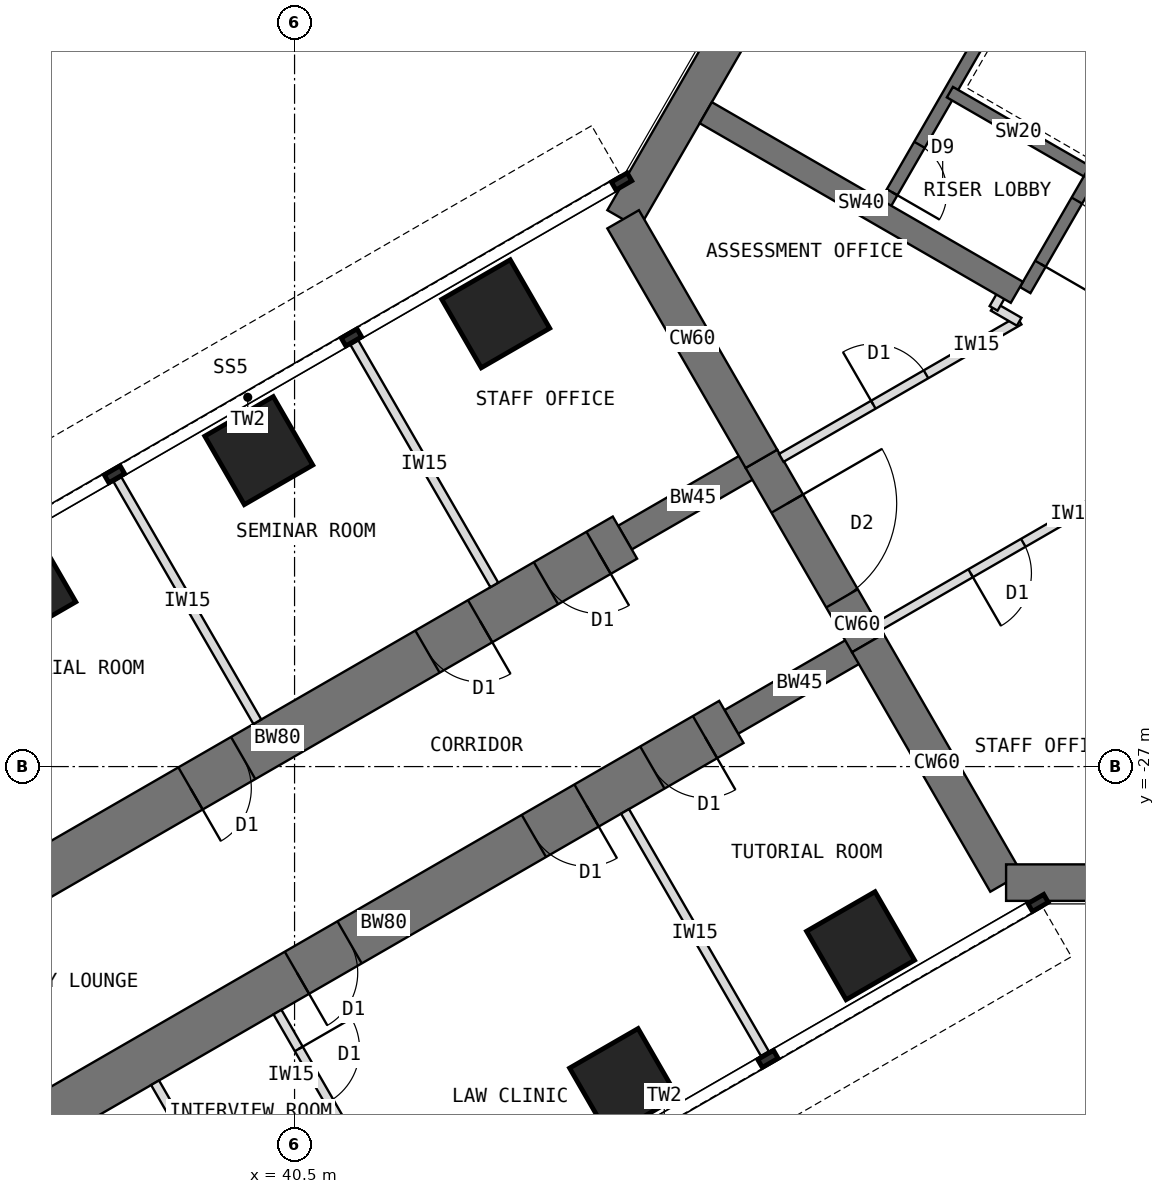
"""IFC4 building model, lengths in metres.
Left out: names, types, materials, properties, quantities, classifications, styles, units other than length and angle.
Written with IfcOpenShell. Run it as: python <this file> out.ifc"""

import sys

from ifc_helpers import new_model, si_unit, direction, frame, frame_2d, origin, origin_2d, place, context, subcontext, project, spatial, rectangle, extrude, element, fill, save


model = new_model("IFC4")
c1 = context("Model", 3, precision=1e-05, world=origin(), true_north=direction((0.0, 1.0)))
c2 = subcontext(c1, "Body", "Model", "MODEL_VIEW")
j1 = project(units=[si_unit("LENGTHUNIT", "METRE"), si_unit("PLANEANGLEUNIT", "RADIAN")], contexts=[c1])
p1 = place(None, origin())
s1 = spatial("IfcSite", under=j1, at=p1, CompositionType="ELEMENT")
p2 = place(p1, origin())
s2 = spatial("IfcBuilding", under=s1, at=p2, CompositionType="ELEMENT")
p3 = place(p2, frame((0.0, 0.0, 121.5)))
s3 = spatial("IfcBuildingStorey", under=s2, at=p3, CompositionType="ELEMENT", Elevation=121.5)
p4 = place(p3, frame((52.202, -7.092, 0.0), z_axis=(0.0, 0.0, 1.0), x_axis=(-0.500005998175, -0.866021940709, 0.0)))
e1 = element("IfcWall", 1, at=p4, inside=s3, PredefinedType="SHEAR", context=c2, shape_type="SweptSolid", body=[
    extrude(rectangle(XDim=12.596, YDim=0.6, at=frame_2d((6.298, 0.0))), origin(), (0.0, 0.0, 1.0), 4.0),
])
p5 = place(p3, frame((45.904, -18.0, 0.0), z_axis=(0.0, 0.0, 1.0), x_axis=(0.500024481964, -0.866011268655, 0.0)))
e2 = element("IfcWall", 2, at=p5, inside=s3, PredefinedType="SHEAR", context=c2, shape_type="SweptSolid", body=[
    extrude(rectangle(XDim=4.548, YDim=0.6, at=frame_2d((2.274, 0.0))), origin(), (0.0, 0.0, 1.0), 4.0),
])
p6 = place(p3, frame((48.178, -21.939, 0.0), z_axis=(0.0, 0.0, 1.0), x_axis=(0.500010275428, -0.866019471182, 0.0)))
e3 = element("IfcWall", 3, at=p6, inside=s3, PredefinedType="SHEAR", context=c2, shape_type="SweptSolid", body=[
    extrude(rectangle(XDim=3.5, YDim=0.6, at=frame_2d((1.75, 0.0))), origin(), (0.0, 0.0, 1.0), 4.0),
])
p7 = place(p6, frame((0.85, 0.0, 0.0)))
e4 = element("IfcOpeningElement", 4, at=p7, cuts=e3, PredefinedType="OPENING", context=c2, shape_type="SweptSolid", body=[
    extrude(rectangle(XDim=1.8, YDim=2.1, at=frame_2d((0.9, 1.05))), frame((0.0, 0.31, 0.0), z_axis=(0.0, -1.0, 0.0), x_axis=(1.0, 0.0, 0.0)), (0.0, 0.0, 1.0), 0.62),
])
p8 = place(p3, frame((49.928, -24.97, 0.0), z_axis=(0.0, 0.0, 1.0), x_axis=(0.499984222037, -0.866034513004, 0.0)))
e5 = element("IfcWall", 5, at=p8, inside=s3, PredefinedType="SHEAR", context=c2, shape_type="SweptSolid", body=[
    extrude(rectangle(XDim=4.548, YDim=0.6, at=frame_2d((2.274, 0.0))), origin(), (0.0, 0.0, 1.0), 4.0),
])
p9 = place(p3, frame((52.202, -28.908, 0.0), z_axis=(0.0, 0.0, 1.0), x_axis=(1.0, 0.0, 0.0)))
e6 = element("IfcWall", 6, at=p9, inside=s3, PredefinedType="SHEAR", context=c2, shape_type="SweptSolid", body=[
    extrude(rectangle(XDim=12.596, YDim=0.6, at=frame_2d((6.298, 0.0))), origin(), (0.0, 0.0, 1.0), 4.0),
])
p10 = place(p3, frame((49.928, -24.97, 0.0), z_axis=(0.0, 0.0, 1.0), x_axis=(-0.866031863473, -0.499988811324, 0.0)))
e7 = element("IfcWall", 7, at=p10, inside=s3, PredefinedType="SHEAR", context=c2, shape_type="SweptSolid", body=[
    extrude(rectangle(XDim=2.592, YDim=0.45, at=frame_2d((1.296, 0.0))), origin(), (0.0, 0.0, 1.0), 4.0),
])
p11 = place(p3, frame((47.684, -26.266, 0.0), z_axis=(0.0, 0.0, 1.0), x_axis=(-0.866027579429, -0.499996231654, 0.0)))
e8 = element("IfcWall", 8, at=p11, inside=s3, PredefinedType="SHEAR", context=c2, shape_type="SweptSolid", body=[
    extrude(rectangle(XDim=13.2, YDim=0.8, at=frame_2d((6.6, 0.0))), origin(), (0.0, 0.0, 1.0), 4.0),
])
p12 = place(p11, frame((0.5, 0.0, 0.0)))
e9 = element("IfcOpeningElement", 9, at=p12, cuts=e8, PredefinedType="OPENING", context=c2, shape_type="SweptSolid", body=[
    extrude(rectangle(XDim=1.0, YDim=2.1, at=frame_2d((0.5, 1.05))), frame((0.0, 0.41, 0.0), z_axis=(0.0, -1.0, 0.0), x_axis=(1.0, 0.0, 0.0)), (0.0, 0.0, 1.0), 0.82),
])
p13 = place(p11, frame((2.75, 0.0, 0.0)))
e10 = element("IfcOpeningElement", 10, at=p13, cuts=e8, PredefinedType="OPENING", context=c2, shape_type="SweptSolid", body=[
    extrude(rectangle(XDim=1.0, YDim=2.1, at=frame_2d((0.5, 1.05))), frame((0.0, 0.41, 0.0), z_axis=(0.0, -1.0, 0.0), x_axis=(1.0, 0.0, 0.0)), (0.0, 0.0, 1.0), 0.82),
])
p14 = place(p11, frame((7.25, 0.0, 0.0)))
e11 = element("IfcOpeningElement", 11, at=p14, cuts=e8, PredefinedType="OPENING", context=c2, shape_type="SweptSolid", body=[
    extrude(rectangle(XDim=1.0, YDim=2.1, at=frame_2d((0.5, 1.05))), frame((0.0, 0.41, 0.0), z_axis=(0.0, -1.0, 0.0), x_axis=(1.0, 0.0, 0.0)), (0.0, 0.0, 1.0), 0.82),
])
p15 = place(p3, frame((48.178, -21.939, 0.0), z_axis=(0.0, 0.0, 1.0), x_axis=(-0.866072649678, -0.499918158782, 0.0)))
e12 = element("IfcWall", 12, at=p15, inside=s3, PredefinedType="SHEAR", context=c2, shape_type="SweptSolid", body=[
    extrude(rectangle(XDim=2.592, YDim=0.45, at=frame_2d((1.296, 0.0))), origin(), (0.0, 0.0, 1.0), 4.0),
])
p16 = place(p3, frame((45.934, -23.234, 0.0), z_axis=(0.0, 0.0, 1.0), x_axis=(-0.866019570528, -0.500010103361, 0.0)))
e13 = element("IfcWall", 13, at=p16, inside=s3, PredefinedType="SHEAR", context=c2, shape_type="SweptSolid", body=[
    extrude(rectangle(XDim=13.2, YDim=0.8, at=frame_2d((6.6, 0.0))), origin(), (0.0, 0.0, 1.0), 4.0),
])
p17 = place(p16, frame((0.5, 0.0, 0.0)))
e14 = element("IfcOpeningElement", 14, at=p17, cuts=e13, PredefinedType="OPENING", context=c2, shape_type="SweptSolid", body=[
    extrude(rectangle(XDim=1.0, YDim=2.1, at=frame_2d((0.5, 1.05))), frame((0.0, 0.41, 0.0), z_axis=(0.0, -1.0, 0.0), x_axis=(1.0, 0.0, 0.0)), (0.0, 0.0, 1.0), 0.82),
])
p18 = place(p16, frame((2.75, 0.0, 0.0)))
e15 = element("IfcOpeningElement", 15, at=p18, cuts=e13, PredefinedType="OPENING", context=c2, shape_type="SweptSolid", body=[
    extrude(rectangle(XDim=1.0, YDim=2.1, at=frame_2d((0.5, 1.05))), frame((0.0, 0.41, 0.0), z_axis=(0.0, -1.0, 0.0), x_axis=(1.0, 0.0, 0.0)), (0.0, 0.0, 1.0), 0.82),
])
p19 = place(p16, frame((7.25, 0.0, 0.0)))
e16 = element("IfcOpeningElement", 16, at=p19, cuts=e13, PredefinedType="OPENING", context=c2, shape_type="SweptSolid", body=[
    extrude(rectangle(XDim=1.0, YDim=2.1, at=frame_2d((0.5, 1.05))), frame((0.0, 0.41, 0.0), z_axis=(0.0, -1.0, 0.0), x_axis=(1.0, 0.0, 0.0)), (0.0, 0.0, 1.0), 0.82),
])
for number, where, z_axis, x_axis in (
    (17, (49.809, -29.946, 0.0), (0.0, 0.0, 1.0), (0.866, 0.5, 0.0)),
    (18, (43.809, -19.554, 0.0), (0.0, 0.0, 1.0), (0.866, 0.5, 0.0)),
    (19, (45.912, -32.196, 0.0), (0.0, 0.0, 1.0), (0.866, 0.5, 0.0)),
    (20, (39.912, -21.804, 0.0), (0.0, 0.0, 1.0), (0.866, 0.5, 0.0)),
    (21, (36.014, -24.054, 0.0), (0.0, 0.0, 1.0), (0.866, 0.5, 0.0)),
):
    element("IfcColumn", number, at=place(p3, frame(where, z_axis=z_axis, x_axis=x_axis)), inside=s3, PredefinedType="COLUMN", context=c2, shape_type="SweptSolid", body=[
        extrude(rectangle(XDim=1.3, YDim=1.3, at=origin_2d()), origin(), (0.0, 0.0, 1.0), 4.0),
    ])
p20 = place(p3, frame((56.516, -12.236, 0.0), z_axis=(0.0, 0.0, 1.0), x_axis=(-0.49999894854, -0.866026010844, 0.0)))
e22 = element("IfcWall", 22, at=p20, inside=s3, PredefinedType="SHEAR", context=c2, shape_type="SweptSolid", body=[
    extrude(rectangle(XDim=8.0, YDim=0.2, at=frame_2d((4.0, 0.0))), origin(), (0.0, 0.0, 1.0), 4.0),
])
p21 = place(p20, frame((6.3, 0.0, 0.0)))
e23 = element("IfcOpeningElement", 23, at=p21, cuts=e22, PredefinedType="OPENING", context=c2, shape_type="SweptSolid", body=[
    extrude(rectangle(XDim=1.2, YDim=2.1, at=frame_2d((0.6, 1.05))), frame((0.0, 0.11, 0.0), z_axis=(0.0, -1.0, 0.0), x_axis=(1.0, 0.0, 0.0)), (0.0, 0.0, 1.0), 0.22),
])
p22 = place(p3, frame((53.53, -17.209, 0.0), z_axis=(0.0, 0.0, 1.0), x_axis=(-0.866062058628, 0.499936506574, 0.0)))
e24 = element("IfcWall", 24, at=p22, inside=s3, PredefinedType="SHEAR", context=c2, shape_type="SweptSolid", body=[
    extrude(rectangle(XDim=2.6, YDim=0.2, at=frame_2d((1.3, 0.0))), origin(), (0.0, 0.0, 1.0), 4.0),
])
p23 = place(p3, frame((54.178, -10.886, 0.0), z_axis=(0.0, 0.0, 1.0), x_axis=(-0.49999894854, -0.866026010844, 0.0)))
e25 = element("IfcWall", 25, at=p23, inside=s3, PredefinedType="SHEAR", context=c2, shape_type="SweptSolid", body=[
    extrude(rectangle(XDim=8.0, YDim=0.2, at=frame_2d((4.0, 0.0))), origin(), (0.0, 0.0, 1.0), 4.0),
])
p24 = place(p23, frame((6.8, 0.0, 0.0)))
e26 = element("IfcOpeningElement", 26, at=p24, cuts=e25, PredefinedType="OPENING", context=c2, shape_type="SweptSolid", body=[
    extrude(rectangle(XDim=0.9, YDim=2.1, at=frame_2d((0.45, 1.05))), frame((0.0, 0.11, 0.0), z_axis=(0.0, -1.0, 0.0), x_axis=(1.0, 0.0, 0.0)), (0.0, 0.0, 1.0), 0.22),
])
p25 = place(p3, frame((52.38, -19.201, 0.0), z_axis=(0.0, 0.0, 1.0), x_axis=(-0.866027317282, 0.49999668571, 0.0)))
e27 = element("IfcWall", 27, at=p25, inside=s3, PredefinedType="SHEAR", context=c2, shape_type="SweptSolid", body=[
    extrude(rectangle(XDim=5.908, YDim=0.4, at=frame_2d((2.954, 0.0))), origin(), (0.0, 0.0, 1.0), 4.0),
])
p26 = place(p3, frame((45.935, -27.737, 0.0), z_axis=(0.0, 0.0, 1.0), x_axis=(0.500014953309, -0.866016770315, 0.0)))
e28 = element("IfcWall", 28, at=p26, inside=s3, PredefinedType="PARTITIONING", context=c2, shape_type="SweptSolid", body=[
    extrude(rectangle(XDim=4.6, YDim=0.15, at=frame_2d((2.3, 0.0))), origin(), (0.0, 0.0, 1.0), 3.8),
])
p27 = place(p3, frame((40.219, -31.037, 0.0), z_axis=(0.0, 0.0, 1.0), x_axis=(0.500033551112, -0.866006032174, 0.0)))
e29 = element("IfcWall", 29, at=p27, inside=s3, PredefinedType="PARTITIONING", context=c2, shape_type="SweptSolid", body=[
    extrude(rectangle(XDim=2.4, YDim=0.15, at=frame_2d((1.2, 0.0))), origin(), (0.0, 0.0, 1.0), 3.8),
])
p28 = place(p27, frame((0.7, 0.0, 0.0)))
e30 = element("IfcOpeningElement", 30, at=p28, cuts=e29, PredefinedType="OPENING", context=c2, shape_type="SweptSolid", body=[
    extrude(rectangle(XDim=1.0, YDim=2.1, at=frame_2d((0.5, 1.05))), frame((0.0, 0.085, 0.0), z_axis=(0.0, -1.0, 0.0), x_axis=(1.0, 0.0, 0.0)), (0.0, 0.0, 1.0), 0.17),
])
p29 = place(p3, frame((38.206, -32.199, 0.0), z_axis=(0.0, 0.0, 1.0), x_axis=(0.500001309137, -0.866024647952, 0.0)))
e31 = element("IfcWall", 31, at=p29, inside=s3, PredefinedType="PARTITIONING", context=c2, shape_type="SweptSolid", body=[
    extrude(rectangle(XDim=2.4, YDim=0.15, at=frame_2d((1.2, 0.0))), origin(), (0.0, 0.0, 1.0), 3.8),
])
for number, where, z_axis, x_axis in (
    (32, (43.785, -24.013, 0.0), (0.0, 0.0, 1.0), (-0.5, 0.866, 0.0)),
    (33, (39.888, -26.263, 0.0), (0.0, 0.0, 1.0), (-0.5, 0.866, 0.0)),
):
    element("IfcWall", number, at=place(p3, frame(where, z_axis=z_axis, x_axis=x_axis)), inside=s3, PredefinedType="PARTITIONING", context=c2, shape_type="SweptSolid", body=[
        extrude(rectangle(XDim=4.6, YDim=0.15, at=frame_2d((2.3, 0.0))), origin(), (0.0, 0.0, 1.0), 3.8),
    ])
p30 = place(p3, frame((54.017, -22.436, 0.0), z_axis=(0.0, 0.0, 1.0), x_axis=(-0.86602002524, -0.500009315796, 0.0)))
e34 = element("IfcWall", 34, at=p30, inside=s3, PredefinedType="PARTITIONING", context=c2, shape_type="SweptSolid", body=[
    extrude(rectangle(XDim=4.519, YDim=0.15, at=frame_2d((2.259, 0.0))), origin(), (0.0, 0.0, 1.0), 3.8),
])
p31 = place(p30, frame((1.769, 0.0, 0.0)))
e35 = element("IfcOpeningElement", 35, at=p31, cuts=e34, PredefinedType="OPENING", context=c2, shape_type="SweptSolid", body=[
    extrude(rectangle(XDim=1.0, YDim=2.1, at=frame_2d((0.5, 1.05))), frame((0.0, 0.085, 0.0), z_axis=(0.0, -1.0, 0.0), x_axis=(1.0, 0.0, 0.0)), (0.0, 0.0, 1.0), 0.17),
])
p32 = place(p3, frame((48.504, -21.924, 0.0), z_axis=(0.0, 0.0, 1.0), x_axis=(0.866006515865, 0.500032713409, 0.0)))
e36 = element("IfcWall", 36, at=p32, inside=s3, PredefinedType="PARTITIONING", context=c2, shape_type="SweptSolid", body=[
    extrude(rectangle(XDim=4.518, YDim=0.15, at=frame_2d((2.259, 0.0))), origin(), (0.0, 0.0, 1.0), 3.8),
])
p33 = place(p32, frame((1.749, 0.0, 0.0)))
e37 = element("IfcOpeningElement", 37, at=p33, cuts=e36, PredefinedType="OPENING", context=c2, shape_type="SweptSolid", body=[
    extrude(rectangle(XDim=1.0, YDim=2.1, at=frame_2d((0.5, 1.05))), frame((0.0, 0.085, 0.0), z_axis=(0.0, -1.0, 0.0), x_axis=(1.0, 0.0, 0.0)), (0.0, 0.0, 1.0), 0.17),
])
p34 = place(p3, frame((52.417, -19.684, 0.0), z_axis=(0.0, 0.0, 1.0), x_axis=(-0.865831790172, 0.50033519877, 0.0)))
e38 = element("IfcWall", 38, at=p34, inside=s3, PredefinedType="PARTITIONING", context=c2, shape_type="SweptSolid", body=[
    extrude(rectangle(XDim=0.494, YDim=0.15, at=frame_2d((0.247, 0.0))), origin(), (0.0, 0.0, 1.0), 3.8),
])
p35 = place(p3, frame((51.997, -19.464, 0.0), z_axis=(0.0, 0.0, 1.0), x_axis=(0.499804398801, 0.866138304741, 0.0)))
e39 = element("IfcWall", 39, at=p35, inside=s3, PredefinedType="PARTITIONING", context=c2, shape_type="SweptSolid", body=[
    extrude(rectangle(XDim=0.43, YDim=0.15, at=frame_2d((0.215, 0.0))), origin(), (0.0, 0.0, 1.0), 3.8),
])
p36 = place(p21, origin())
e40 = element("IfcDoor", 40, at=p36, inside=s3, OperationType="SINGLE_SWING_RIGHT", PredefinedType="DOOR", context=c2, shape_type="SweptSolid", body=[
    extrude(rectangle(XDim=1.2, YDim=2.1, at=frame_2d((0.6, 1.05))), frame((0.0, 0.025, 0.0), z_axis=(0.0, -1.0, 0.0), x_axis=(1.0, 0.0, 0.0)), (0.0, 0.0, 1.0), 0.05),
])
fill(e23, e40)
p37 = place(p24, origin())
e41 = element("IfcDoor", 41, at=p37, inside=s3, OperationType="SINGLE_SWING_RIGHT", PredefinedType="DOOR", context=c2, shape_type="SweptSolid", body=[
    extrude(rectangle(XDim=0.9, YDim=2.1, at=frame_2d((0.45, 1.05))), frame((0.0, 0.025, 0.0), z_axis=(0.0, -1.0, 0.0), x_axis=(1.0, 0.0, 0.0)), (0.0, 0.0, 1.0), 0.05),
])
fill(e26, e41)
p38 = place(p7, origin())
e42 = element("IfcDoor", 42, at=p38, inside=s3, OperationType="DOUBLE_DOOR_DOUBLE_SWING", PredefinedType="DOOR", context=c2, shape_type="SweptSolid", body=[
    extrude(rectangle(XDim=1.72, YDim=2.06, at=frame_2d((0.9, 1.03))), frame((0.0, 0.025, 0.0), z_axis=(0.0, -1.0, 0.0), x_axis=(1.0, 0.0, 0.0)), (0.0, 0.0, 1.0), 0.05),
    extrude(rectangle(XDim=0.04, YDim=2.1, at=frame_2d((0.02, 1.05))), frame((0.0, 0.3, 0.0), z_axis=(0.0, -1.0, 0.0), x_axis=(1.0, 0.0, 0.0)), (0.0, 0.0, 1.0), 0.6),
    extrude(rectangle(XDim=0.04, YDim=2.1, at=frame_2d((1.78, 1.05))), frame((0.0, 0.3, 0.0), z_axis=(0.0, -1.0, 0.0), x_axis=(1.0, 0.0, 0.0)), (0.0, 0.0, 1.0), 0.6),
    extrude(rectangle(XDim=1.72, YDim=0.04, at=frame_2d((0.9, 2.08))), frame((0.0, 0.3, 0.0), z_axis=(0.0, -1.0, 0.0), x_axis=(1.0, 0.0, 0.0)), (0.0, 0.0, 1.0), 0.6),
])
fill(e4, e42)
p39 = place(p28, origin())
e43 = element("IfcDoor", 43, at=p39, inside=s3, OperationType="SINGLE_SWING_LEFT", PredefinedType="DOOR", context=c2, shape_type="SweptSolid", body=[
    extrude(rectangle(XDim=1.0, YDim=2.1, at=frame_2d((0.5, 1.05))), frame((0.0, 0.025, 0.0), z_axis=(0.0, -1.0, 0.0), x_axis=(1.0, 0.0, 0.0)), (0.0, 0.0, 1.0), 0.05),
])
fill(e30, e43)
p40 = place(p33, origin())
e44 = element("IfcDoor", 44, at=p40, inside=s3, OperationType="SINGLE_SWING_LEFT", PredefinedType="DOOR", context=c2, shape_type="SweptSolid", body=[
    extrude(rectangle(XDim=1.0, YDim=2.1, at=frame_2d((0.5, 1.05))), frame((0.0, 0.025, 0.0), z_axis=(0.0, -1.0, 0.0), x_axis=(1.0, 0.0, 0.0)), (0.0, 0.0, 1.0), 0.05),
])
fill(e37, e44)
p41 = place(p31, origin())
e45 = element("IfcDoor", 45, at=p41, inside=s3, OperationType="SINGLE_SWING_RIGHT", PredefinedType="DOOR", context=c2, shape_type="SweptSolid", body=[
    extrude(rectangle(XDim=1.0, YDim=2.1, at=frame_2d((0.5, 1.05))), frame((0.0, 0.025, 0.0), z_axis=(0.0, -1.0, 0.0), x_axis=(1.0, 0.0, 0.0)), (0.0, 0.0, 1.0), 0.05),
])
fill(e35, e45)
p42 = place(p12, origin())
e46 = element("IfcDoor", 46, at=p42, inside=s3, OperationType="SINGLE_SWING_LEFT", PredefinedType="DOOR", context=c2, shape_type="SweptSolid", body=[
    extrude(rectangle(XDim=0.92, YDim=2.06, at=frame_2d((0.5, 1.03))), frame((0.0, 0.025, 0.0), z_axis=(0.0, -1.0, 0.0), x_axis=(1.0, 0.0, 0.0)), (0.0, 0.0, 1.0), 0.05),
    extrude(rectangle(XDim=0.04, YDim=2.1, at=frame_2d((0.02, 1.05))), frame((0.0, 0.4, 0.0), z_axis=(0.0, -1.0, 0.0), x_axis=(1.0, 0.0, 0.0)), (0.0, 0.0, 1.0), 0.8),
    extrude(rectangle(XDim=0.04, YDim=2.1, at=frame_2d((0.98, 1.05))), frame((0.0, 0.4, 0.0), z_axis=(0.0, -1.0, 0.0), x_axis=(1.0, 0.0, 0.0)), (0.0, 0.0, 1.0), 0.8),
    extrude(rectangle(XDim=0.92, YDim=0.04, at=frame_2d((0.5, 2.08))), frame((0.0, 0.4, 0.0), z_axis=(0.0, -1.0, 0.0), x_axis=(1.0, 0.0, 0.0)), (0.0, 0.0, 1.0), 0.8),
])
fill(e9, e46)
p43 = place(p13, origin())
e47 = element("IfcDoor", 47, at=p43, inside=s3, OperationType="SINGLE_SWING_LEFT", PredefinedType="DOOR", context=c2, shape_type="SweptSolid", body=[
    extrude(rectangle(XDim=0.92, YDim=2.06, at=frame_2d((0.5, 1.03))), frame((0.0, 0.025, 0.0), z_axis=(0.0, -1.0, 0.0), x_axis=(1.0, 0.0, 0.0)), (0.0, 0.0, 1.0), 0.05),
    extrude(rectangle(XDim=0.04, YDim=2.1, at=frame_2d((0.02, 1.05))), frame((0.0, 0.4, 0.0), z_axis=(0.0, -1.0, 0.0), x_axis=(1.0, 0.0, 0.0)), (0.0, 0.0, 1.0), 0.8),
    extrude(rectangle(XDim=0.04, YDim=2.1, at=frame_2d((0.98, 1.05))), frame((0.0, 0.4, 0.0), z_axis=(0.0, -1.0, 0.0), x_axis=(1.0, 0.0, 0.0)), (0.0, 0.0, 1.0), 0.8),
    extrude(rectangle(XDim=0.92, YDim=0.04, at=frame_2d((0.5, 2.08))), frame((0.0, 0.4, 0.0), z_axis=(0.0, -1.0, 0.0), x_axis=(1.0, 0.0, 0.0)), (0.0, 0.0, 1.0), 0.8),
])
fill(e10, e47)
p44 = place(p14, origin())
e48 = element("IfcDoor", 48, at=p44, inside=s3, OperationType="SINGLE_SWING_RIGHT", PredefinedType="DOOR", context=c2, shape_type="SweptSolid", body=[
    extrude(rectangle(XDim=0.92, YDim=2.06, at=frame_2d((0.5, 1.03))), frame((0.0, 0.025, 0.0), z_axis=(0.0, -1.0, 0.0), x_axis=(1.0, 0.0, 0.0)), (0.0, 0.0, 1.0), 0.05),
    extrude(rectangle(XDim=0.04, YDim=2.1, at=frame_2d((0.02, 1.05))), frame((0.0, 0.4, 0.0), z_axis=(0.0, -1.0, 0.0), x_axis=(1.0, 0.0, 0.0)), (0.0, 0.0, 1.0), 0.8),
    extrude(rectangle(XDim=0.04, YDim=2.1, at=frame_2d((0.98, 1.05))), frame((0.0, 0.4, 0.0), z_axis=(0.0, -1.0, 0.0), x_axis=(1.0, 0.0, 0.0)), (0.0, 0.0, 1.0), 0.8),
    extrude(rectangle(XDim=0.92, YDim=0.04, at=frame_2d((0.5, 2.08))), frame((0.0, 0.4, 0.0), z_axis=(0.0, -1.0, 0.0), x_axis=(1.0, 0.0, 0.0)), (0.0, 0.0, 1.0), 0.8),
])
fill(e11, e48)
p45 = place(p17, origin())
e49 = element("IfcDoor", 49, at=p45, inside=s3, OperationType="SINGLE_SWING_LEFT", PredefinedType="DOOR", context=c2, shape_type="SweptSolid", body=[
    extrude(rectangle(XDim=0.92, YDim=2.06, at=frame_2d((0.5, 1.03))), frame((0.0, 0.025, 0.0), z_axis=(0.0, -1.0, 0.0), x_axis=(1.0, 0.0, 0.0)), (0.0, 0.0, 1.0), 0.05),
    extrude(rectangle(XDim=0.04, YDim=2.1, at=frame_2d((0.02, 1.05))), frame((0.0, 0.4, 0.0), z_axis=(0.0, -1.0, 0.0), x_axis=(1.0, 0.0, 0.0)), (0.0, 0.0, 1.0), 0.8),
    extrude(rectangle(XDim=0.04, YDim=2.1, at=frame_2d((0.98, 1.05))), frame((0.0, 0.4, 0.0), z_axis=(0.0, -1.0, 0.0), x_axis=(1.0, 0.0, 0.0)), (0.0, 0.0, 1.0), 0.8),
    extrude(rectangle(XDim=0.92, YDim=0.04, at=frame_2d((0.5, 2.08))), frame((0.0, 0.4, 0.0), z_axis=(0.0, -1.0, 0.0), x_axis=(1.0, 0.0, 0.0)), (0.0, 0.0, 1.0), 0.8),
])
fill(e14, e49)
p46 = place(p18, origin())
e50 = element("IfcDoor", 50, at=p46, inside=s3, OperationType="SINGLE_SWING_LEFT", PredefinedType="DOOR", context=c2, shape_type="SweptSolid", body=[
    extrude(rectangle(XDim=0.92, YDim=2.06, at=frame_2d((0.5, 1.03))), frame((0.0, 0.025, 0.0), z_axis=(0.0, -1.0, 0.0), x_axis=(1.0, 0.0, 0.0)), (0.0, 0.0, 1.0), 0.05),
    extrude(rectangle(XDim=0.04, YDim=2.1, at=frame_2d((0.02, 1.05))), frame((0.0, 0.4, 0.0), z_axis=(0.0, -1.0, 0.0), x_axis=(1.0, 0.0, 0.0)), (0.0, 0.0, 1.0), 0.8),
    extrude(rectangle(XDim=0.04, YDim=2.1, at=frame_2d((0.98, 1.05))), frame((0.0, 0.4, 0.0), z_axis=(0.0, -1.0, 0.0), x_axis=(1.0, 0.0, 0.0)), (0.0, 0.0, 1.0), 0.8),
    extrude(rectangle(XDim=0.92, YDim=0.04, at=frame_2d((0.5, 2.08))), frame((0.0, 0.4, 0.0), z_axis=(0.0, -1.0, 0.0), x_axis=(1.0, 0.0, 0.0)), (0.0, 0.0, 1.0), 0.8),
])
fill(e15, e50)
p47 = place(p19, origin())
e51 = element("IfcDoor", 51, at=p47, inside=s3, OperationType="SINGLE_SWING_RIGHT", PredefinedType="DOOR", context=c2, shape_type="SweptSolid", body=[
    extrude(rectangle(XDim=0.92, YDim=2.06, at=frame_2d((0.5, 1.03))), frame((0.0, 0.025, 0.0), z_axis=(0.0, -1.0, 0.0), x_axis=(1.0, 0.0, 0.0)), (0.0, 0.0, 1.0), 0.05),
    extrude(rectangle(XDim=0.04, YDim=2.1, at=frame_2d((0.02, 1.05))), frame((0.0, 0.4, 0.0), z_axis=(0.0, -1.0, 0.0), x_axis=(1.0, 0.0, 0.0)), (0.0, 0.0, 1.0), 0.8),
    extrude(rectangle(XDim=0.04, YDim=2.1, at=frame_2d((0.98, 1.05))), frame((0.0, 0.4, 0.0), z_axis=(0.0, -1.0, 0.0), x_axis=(1.0, 0.0, 0.0)), (0.0, 0.0, 1.0), 0.8),
    extrude(rectangle(XDim=0.92, YDim=0.04, at=frame_2d((0.5, 2.08))), frame((0.0, 0.4, 0.0), z_axis=(0.0, -1.0, 0.0), x_axis=(1.0, 0.0, 0.0)), (0.0, 0.0, 1.0), 0.8),
])
fill(e16, e51)
save(model, sys.argv[1])
